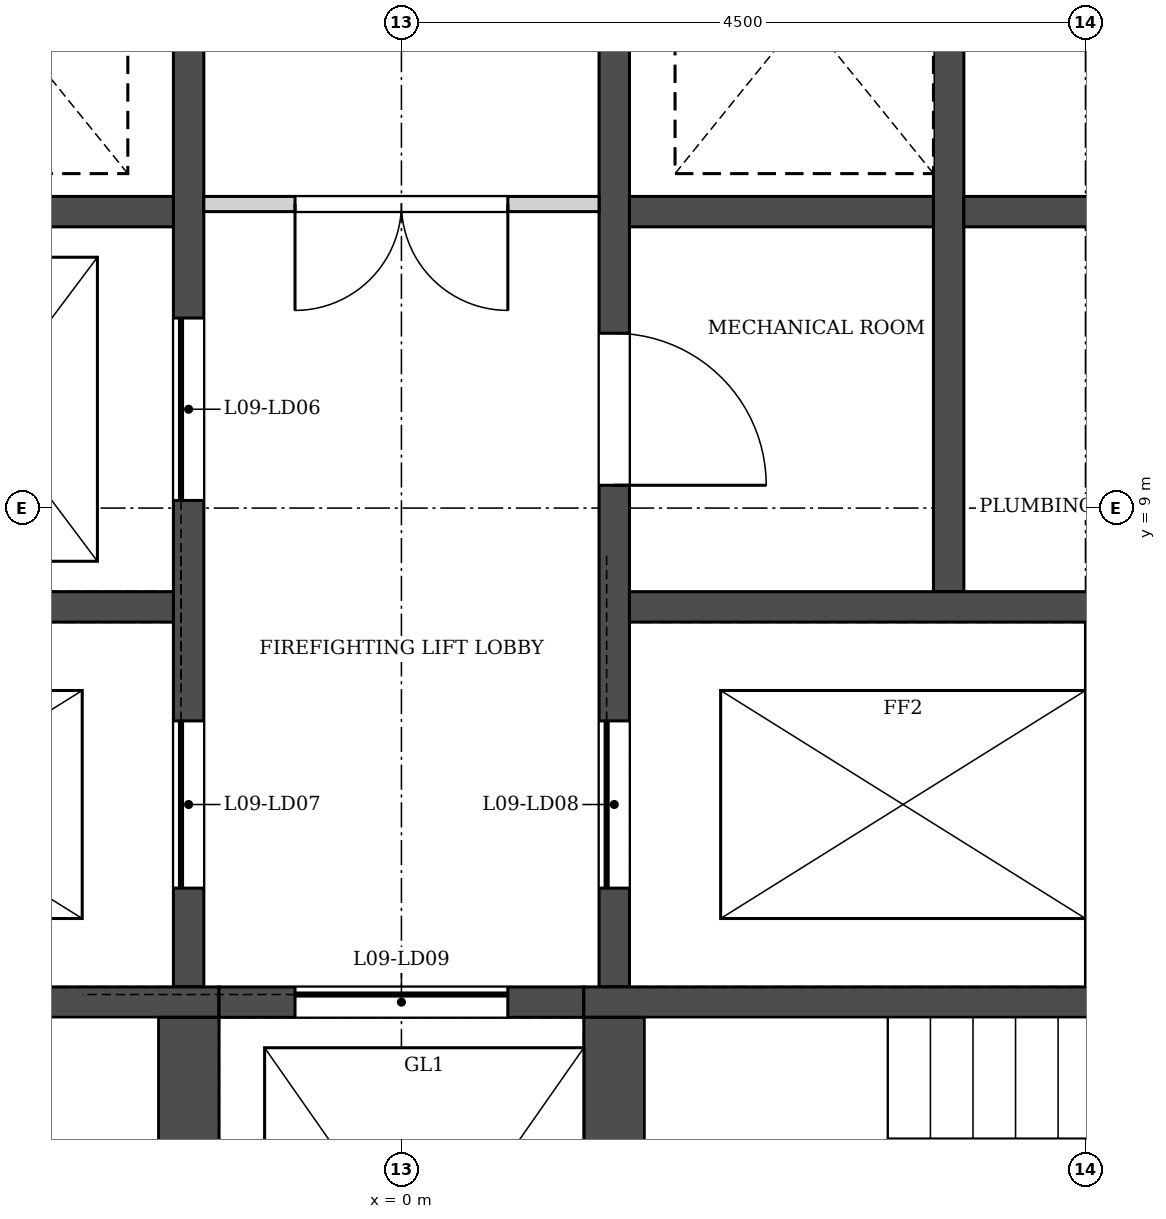
"""IFC4 building model, lengths in metres.
Left out: names, types, materials, properties, quantities, classifications, styles, units other than length and angle.
Written with IfcOpenShell. Run it as: python <this file> out.ifc"""

import sys

from ifc_helpers import new_model, si_unit, direction, frame, frame_2d, origin, place, context, subcontext, project, spatial, rectangle, extrude, element, fill, save


model = new_model("IFC4")
c1 = context("Model", 3, precision=1e-05, world=origin(), true_north=direction((0.0, 1.0)))
c2 = subcontext(c1, "Body", "Model", "MODEL_VIEW")
j1 = project(units=[si_unit("LENGTHUNIT", "METRE"), si_unit("PLANEANGLEUNIT", "RADIAN")], contexts=[c1])
p1 = place(None, origin())
s1 = spatial("IfcSite", under=j1, at=p1, CompositionType="ELEMENT")
p2 = place(p1, origin())
s2 = spatial("IfcBuilding", under=s1, at=p2, CompositionType="ELEMENT")
p3 = place(p2, frame((0.0, 0.0, 47.5)))
s3 = spatial("IfcBuildingStorey", under=s2, at=p3, CompositionType="ELEMENT", Elevation=47.5)
p4 = place(p3, frame((31.98, 7.709, 0.0), z_axis=(0.0, 0.0, 1.0), x_axis=(-0.500000125387, 0.866025331392, 0.0)))
e1 = element("IfcWall", 1, at=p4, inside=s3, PredefinedType="SOLIDWALL", context=c2, shape_type="SweptSolid", body=[
    extrude(rectangle(XDim=55.255, YDim=0.34, at=frame_2d((27.628, 0.0))), origin(), (0.0, 0.0, 1.0), 5.1),
])
p5 = place(p4, frame((1.314, 0.0, 0.9)))
e2 = element("IfcOpeningElement", 2, at=p5, cuts=e1, PredefinedType="OPENING", context=c2, shape_type="SweptSolid", body=[
    extrude(rectangle(XDim=1.885, YDim=3.0, at=frame_2d((0.942, 1.5))), frame((0.0, 0.18, 0.0), z_axis=(0.0, -1.0, 0.0), x_axis=(1.0, 0.0, 0.0)), (0.0, 0.0, 1.0), 0.36),
])
p6 = place(p4, frame((4.314, 0.0, 0.9)))
e3 = element("IfcOpeningElement", 3, at=p6, cuts=e1, PredefinedType="OPENING", context=c2, shape_type="SweptSolid", body=[
    extrude(rectangle(XDim=1.885, YDim=3.0, at=frame_2d((0.942, 1.5))), frame((0.0, 0.18, 0.0), z_axis=(0.0, -1.0, 0.0), x_axis=(1.0, 0.0, 0.0)), (0.0, 0.0, 1.0), 0.36),
])
p7 = place(p4, frame((7.314, 0.0, 0.9)))
e4 = element("IfcOpeningElement", 4, at=p7, cuts=e1, PredefinedType="OPENING", context=c2, shape_type="SweptSolid", body=[
    extrude(rectangle(XDim=1.885, YDim=3.0, at=frame_2d((0.942, 1.5))), frame((0.0, 0.18, 0.0), z_axis=(0.0, -1.0, 0.0), x_axis=(1.0, 0.0, 0.0)), (0.0, 0.0, 1.0), 0.36),
])
p8 = place(p4, frame((10.314, 0.0, 0.9)))
e5 = element("IfcOpeningElement", 5, at=p8, cuts=e1, PredefinedType="OPENING", context=c2, shape_type="SweptSolid", body=[
    extrude(rectangle(XDim=1.885, YDim=3.0, at=frame_2d((0.942, 1.5))), frame((0.0, 0.18, 0.0), z_axis=(0.0, -1.0, 0.0), x_axis=(1.0, 0.0, 0.0)), (0.0, 0.0, 1.0), 0.36),
])
p9 = place(p4, frame((13.314, 0.0, 0.9)))
e6 = element("IfcOpeningElement", 6, at=p9, cuts=e1, PredefinedType="OPENING", context=c2, shape_type="SweptSolid", body=[
    extrude(rectangle(XDim=1.885, YDim=3.0, at=frame_2d((0.942, 1.5))), frame((0.0, 0.18, 0.0), z_axis=(0.0, -1.0, 0.0), x_axis=(1.0, 0.0, 0.0)), (0.0, 0.0, 1.0), 0.36),
])
p10 = place(p4, frame((16.314, 0.0, 0.9)))
e7 = element("IfcOpeningElement", 7, at=p10, cuts=e1, PredefinedType="OPENING", context=c2, shape_type="SweptSolid", body=[
    extrude(rectangle(XDim=1.885, YDim=3.0, at=frame_2d((0.942, 1.5))), frame((0.0, 0.18, 0.0), z_axis=(0.0, -1.0, 0.0), x_axis=(1.0, 0.0, 0.0)), (0.0, 0.0, 1.0), 0.36),
])
p11 = place(p4, frame((19.314, 0.0, 0.9)))
e8 = element("IfcOpeningElement", 8, at=p11, cuts=e1, PredefinedType="OPENING", context=c2, shape_type="SweptSolid", body=[
    extrude(rectangle(XDim=1.885, YDim=3.0, at=frame_2d((0.942, 1.5))), frame((0.0, 0.18, 0.0), z_axis=(0.0, -1.0, 0.0), x_axis=(1.0, 0.0, 0.0)), (0.0, 0.0, 1.0), 0.36),
])
p12 = place(p4, frame((22.314, 0.0, 0.9)))
e9 = element("IfcOpeningElement", 9, at=p12, cuts=e1, PredefinedType="OPENING", context=c2, shape_type="SweptSolid", body=[
    extrude(rectangle(XDim=1.885, YDim=3.0, at=frame_2d((0.942, 1.5))), frame((0.0, 0.18, 0.0), z_axis=(0.0, -1.0, 0.0), x_axis=(1.0, 0.0, 0.0)), (0.0, 0.0, 1.0), 0.36),
])
p13 = place(p4, frame((25.314, 0.0, 0.9)))
e10 = element("IfcOpeningElement", 10, at=p13, cuts=e1, PredefinedType="OPENING", context=c2, shape_type="SweptSolid", body=[
    extrude(rectangle(XDim=1.885, YDim=3.0, at=frame_2d((0.942, 1.5))), frame((0.0, 0.18, 0.0), z_axis=(0.0, -1.0, 0.0), x_axis=(1.0, 0.0, 0.0)), (0.0, 0.0, 1.0), 0.36),
])
p14 = place(p4, frame((28.314, 0.0, 0.9)))
e11 = element("IfcOpeningElement", 11, at=p14, cuts=e1, PredefinedType="OPENING", context=c2, shape_type="SweptSolid", body=[
    extrude(rectangle(XDim=1.885, YDim=3.0, at=frame_2d((0.942, 1.5))), frame((0.0, 0.18, 0.0), z_axis=(0.0, -1.0, 0.0), x_axis=(1.0, 0.0, 0.0)), (0.0, 0.0, 1.0), 0.36),
])
p15 = place(p4, frame((31.314, 0.0, 0.9)))
e12 = element("IfcOpeningElement", 12, at=p15, cuts=e1, PredefinedType="OPENING", context=c2, shape_type="SweptSolid", body=[
    extrude(rectangle(XDim=1.885, YDim=3.0, at=frame_2d((0.942, 1.5))), frame((0.0, 0.18, 0.0), z_axis=(0.0, -1.0, 0.0), x_axis=(1.0, 0.0, 0.0)), (0.0, 0.0, 1.0), 0.36),
])
p16 = place(p4, frame((34.314, 0.0, 0.9)))
e13 = element("IfcOpeningElement", 13, at=p16, cuts=e1, PredefinedType="OPENING", context=c2, shape_type="SweptSolid", body=[
    extrude(rectangle(XDim=1.885, YDim=3.0, at=frame_2d((0.942, 1.5))), frame((0.0, 0.18, 0.0), z_axis=(0.0, -1.0, 0.0), x_axis=(1.0, 0.0, 0.0)), (0.0, 0.0, 1.0), 0.36),
])
p17 = place(p4, frame((37.314, 0.0, 0.9)))
e14 = element("IfcOpeningElement", 14, at=p17, cuts=e1, PredefinedType="OPENING", context=c2, shape_type="SweptSolid", body=[
    extrude(rectangle(XDim=1.885, YDim=3.0, at=frame_2d((0.942, 1.5))), frame((0.0, 0.18, 0.0), z_axis=(0.0, -1.0, 0.0), x_axis=(1.0, 0.0, 0.0)), (0.0, 0.0, 1.0), 0.36),
])
p18 = place(p4, frame((40.314, 0.0, 0.9)))
e15 = element("IfcOpeningElement", 15, at=p18, cuts=e1, PredefinedType="OPENING", context=c2, shape_type="SweptSolid", body=[
    extrude(rectangle(XDim=1.885, YDim=3.0, at=frame_2d((0.942, 1.5))), frame((0.0, 0.18, 0.0), z_axis=(0.0, -1.0, 0.0), x_axis=(1.0, 0.0, 0.0)), (0.0, 0.0, 1.0), 0.36),
])
p19 = place(p4, frame((43.314, 0.0, 0.9)))
e16 = element("IfcOpeningElement", 16, at=p19, cuts=e1, PredefinedType="OPENING", context=c2, shape_type="SweptSolid", body=[
    extrude(rectangle(XDim=1.885, YDim=3.0, at=frame_2d((0.942, 1.5))), frame((0.0, 0.18, 0.0), z_axis=(0.0, -1.0, 0.0), x_axis=(1.0, 0.0, 0.0)), (0.0, 0.0, 1.0), 0.36),
])
p20 = place(p4, frame((46.314, 0.0, 0.9)))
e17 = element("IfcOpeningElement", 17, at=p20, cuts=e1, PredefinedType="OPENING", context=c2, shape_type="SweptSolid", body=[
    extrude(rectangle(XDim=1.885, YDim=3.0, at=frame_2d((0.942, 1.5))), frame((0.0, 0.18, 0.0), z_axis=(0.0, -1.0, 0.0), x_axis=(1.0, 0.0, 0.0)), (0.0, 0.0, 1.0), 0.36),
])
p21 = place(p4, frame((49.314, 0.0, 0.9)))
e18 = element("IfcOpeningElement", 18, at=p21, cuts=e1, PredefinedType="OPENING", context=c2, shape_type="SweptSolid", body=[
    extrude(rectangle(XDim=1.885, YDim=3.0, at=frame_2d((0.942, 1.5))), frame((0.0, 0.18, 0.0), z_axis=(0.0, -1.0, 0.0), x_axis=(1.0, 0.0, 0.0)), (0.0, 0.0, 1.0), 0.36),
])
p22 = place(p4, frame((52.314, 0.0, 0.9)))
e19 = element("IfcOpeningElement", 19, at=p22, cuts=e1, PredefinedType="OPENING", context=c2, shape_type="SweptSolid", body=[
    extrude(rectangle(XDim=1.885, YDim=3.0, at=frame_2d((0.942, 1.5))), frame((0.0, 0.18, 0.0), z_axis=(0.0, -1.0, 0.0), x_axis=(1.0, 0.0, 0.0)), (0.0, 0.0, 1.0), 0.36),
])
p23 = place(p3, frame((3.6, 8.45, -0.3), z_axis=(0.0, 0.0, 1.0), x_axis=(0.0, 1.0, 0.0)))
e20 = element("IfcWall", 20, at=p23, inside=s3, PredefinedType="SOLIDWALL", context=c2, shape_type="SweptSolid", body=[
    extrude(rectangle(XDim=7.8, YDim=0.2, at=frame_2d((3.9, 0.0))), origin(), (0.0, 0.0, 1.0), 5.4),
])
p24 = place(p3, frame((-1.4, 5.85, -0.3), z_axis=(0.0, 0.0, 1.0), x_axis=(0.0, 1.0, 0.0)))
e21 = element("IfcWall", 21, at=p24, inside=s3, PredefinedType="SOLIDWALL", context=c2, shape_type="SweptSolid", body=[
    extrude(rectangle(XDim=11.75, YDim=0.2, at=frame_2d((5.875, 0.0))), origin(), (0.0, 0.0, 1.0), 5.4),
])
p25 = place(p24, frame((3.2, 0.0, 0.3)))
e22 = element("IfcOpeningElement", 22, at=p25, cuts=e21, PredefinedType="OPENING", context=c2, shape_type="SweptSolid", body=[
    extrude(rectangle(XDim=1.2, YDim=2.1, at=frame_2d((0.6, 1.05))), frame((0.0, 0.11, 0.0), z_axis=(0.0, -1.0, 0.0), x_axis=(1.0, 0.0, 0.0)), (0.0, 0.0, 1.0), 0.22),
])
p26 = place(p24, frame((0.65, 0.0, 0.3)))
e23 = element("IfcOpeningElement", 23, at=p26, cuts=e21, PredefinedType="OPENING", context=c2, shape_type="SweptSolid", body=[
    extrude(rectangle(XDim=1.1, YDim=2.1, at=frame_2d((0.55, 1.05))), frame((0.0, 0.11, 0.0), z_axis=(0.0, -1.0, 0.0), x_axis=(1.0, 0.0, 0.0)), (0.0, 0.0, 1.0), 0.22),
])
p27 = place(p3, frame((1.4, 5.85, -0.3), z_axis=(0.0, 0.0, 1.0), x_axis=(0.0, 1.0, 0.0)))
e24 = element("IfcWall", 24, at=p27, inside=s3, PredefinedType="SOLIDWALL", context=c2, shape_type="SweptSolid", body=[
    extrude(rectangle(XDim=11.75, YDim=0.2, at=frame_2d((5.875, 0.0))), origin(), (0.0, 0.0, 1.0), 5.4),
])
p28 = place(p27, frame((0.65, 0.0, 0.3)))
e25 = element("IfcOpeningElement", 25, at=p28, cuts=e24, PredefinedType="OPENING", context=c2, shape_type="SweptSolid", body=[
    extrude(rectangle(XDim=1.1, YDim=2.1, at=frame_2d((0.55, 1.05))), frame((0.0, 0.11, 0.0), z_axis=(0.0, -1.0, 0.0), x_axis=(1.0, 0.0, 0.0)), (0.0, 0.0, 1.0), 0.22),
])
p29 = place(p27, frame((3.3, 0.0, 0.3)))
e26 = element("IfcOpeningElement", 26, at=p29, cuts=e24, PredefinedType="OPENING", context=c2, shape_type="SweptSolid", body=[
    extrude(rectangle(XDim=1.0, YDim=2.1, at=frame_2d((0.5, 1.05))), frame((0.0, 0.11, 0.0), z_axis=(0.0, -1.0, 0.0), x_axis=(1.0, 0.0, 0.0)), (0.0, 0.0, 1.0), 0.22),
])
for number, where, z_axis, x_axis in (
    (27, (-5.7, 8.35, -0.3), (0.0, 0.0, 1.0), (1.0, 0.0, 0.0)),
    (28, (1.5, 8.35, -0.3), (0.0, 0.0, 1.0), (1.0, 0.0, 0.0)),
):
    element("IfcWall", number, at=place(p3, frame(where, z_axis=z_axis, x_axis=x_axis)), inside=s3, PredefinedType="SOLIDWALL", context=c2, shape_type="SweptSolid", body=[
        extrude(rectangle(XDim=4.2, YDim=0.2, at=frame_2d((2.1, 0.0))), origin(), (0.0, 0.0, 1.0), 5.4),
    ])
p30 = place(p3, frame((-12.6, 5.75, -0.3), z_axis=(0.0, 0.0, 1.0), x_axis=(1.0, 0.0, 0.0)))
e29 = element("IfcWall", 29, at=p30, inside=s3, PredefinedType="SOLIDWALL", context=c2, shape_type="SweptSolid", body=[
    extrude(rectangle(XDim=11.4, YDim=0.2, at=frame_2d((5.7, 0.0))), origin(), (0.0, 0.0, 1.0), 5.4),
])
p31 = place(p3, frame((-1.2, 5.75, -0.3), z_axis=(0.0, 0.0, 1.0), x_axis=(1.0, 0.0, 0.0)))
e30 = element("IfcWall", 30, at=p31, inside=s3, PredefinedType="SOLIDWALL", context=c2, shape_type="SweptSolid", body=[
    extrude(rectangle(XDim=2.4, YDim=0.2, at=frame_2d((1.2, 0.0))), origin(), (0.0, 0.0, 1.0), 5.4),
])
p32 = place(p31, frame((0.5, 0.0, 0.3)))
e31 = element("IfcOpeningElement", 31, at=p32, cuts=e30, PredefinedType="OPENING", context=c2, shape_type="SweptSolid", body=[
    extrude(rectangle(XDim=1.4, YDim=2.1, at=frame_2d((0.7, 1.05))), frame((0.0, 0.11, 0.0), z_axis=(0.0, -1.0, 0.0), x_axis=(1.0, 0.0, 0.0)), (0.0, 0.0, 1.0), 0.22),
])
p33 = place(p3, frame((1.2, 5.75, -0.3), z_axis=(0.0, 0.0, 1.0), x_axis=(1.0, 0.0, 0.0)))
e32 = element("IfcWall", 32, at=p33, inside=s3, PredefinedType="SOLIDWALL", context=c2, shape_type="SweptSolid", body=[
    extrude(rectangle(XDim=11.4, YDim=0.2, at=frame_2d((5.7, 0.0))), origin(), (0.0, 0.0, 1.0), 5.4),
])
for number, where, z_axis, x_axis in (
    (33, (-1.4, 2.25, -0.3), (0.0, 0.0, 1.0), (0.0, 1.0, 0.0)),
    (34, (1.4, 2.25, -0.3), (0.0, 0.0, 1.0), (0.0, 1.0, 0.0)),
):
    element("IfcWall", number, at=place(p3, frame(where, z_axis=z_axis, x_axis=x_axis)), inside=s3, PredefinedType="SOLIDWALL", context=c2, shape_type="SweptSolid", body=[
        extrude(rectangle(XDim=3.4, YDim=0.4, at=frame_2d((1.7, 0.0))), origin(), (0.0, 0.0, 1.0), 5.4),
    ])
for number, where, z_axis, x_axis in (
    (35, (-3.5, 10.95, -0.3), (0.0, 0.0, 1.0), (1.0, 0.0, 0.0)),
    (36, (3.7, 10.95, -0.3), (0.0, 0.0, 1.0), (1.0, 0.0, 0.0)),
    (37, (1.5, 10.95, -0.3), (0.0, 0.0, 1.0), (1.0, 0.0, 0.0)),
):
    element("IfcWall", number, at=place(p3, frame(where, z_axis=z_axis, x_axis=x_axis)), inside=s3, PredefinedType="SOLIDWALL", context=c2, shape_type="SweptSolid", body=[
        extrude(rectangle(XDim=2.0, YDim=0.2, at=frame_2d((1.0, 0.0))), origin(), (0.0, 0.0, 1.0), 5.4),
    ])
p34 = place(p3, frame((-1.3, 11.0, 0.0), z_axis=(0.0, 0.0, 1.0), x_axis=(1.0, 0.0, 0.0)))
e38 = element("IfcWall", 38, at=p34, inside=s3, PredefinedType="PARTITIONING", context=c2, shape_type="SweptSolid", body=[
    extrude(rectangle(XDim=2.6, YDim=0.1, at=frame_2d((1.3, 0.0))), origin(), (0.0, 0.0, 1.0), 5.1),
])
p35 = place(p34, frame((0.6, 0.0, 0.0)))
e39 = element("IfcOpeningElement", 39, at=p35, cuts=e38, PredefinedType="OPENING", context=c2, shape_type="SweptSolid", body=[
    extrude(rectangle(XDim=1.4, YDim=2.1, at=frame_2d((0.7, 1.05))), frame((0.0, 0.06, 0.0), z_axis=(0.0, -1.0, 0.0), x_axis=(1.0, 0.0, 0.0)), (0.0, 0.0, 1.0), 0.12),
])
p36 = place(p25, origin())
e40 = element("IfcDoor", 40, at=p36, inside=s3, OperationType="SLIDING_TO_LEFT", PredefinedType="DOOR", context=c2, shape_type="SweptSolid", body=[
    extrude(rectangle(XDim=1.2, YDim=2.1, at=frame_2d((0.6, 1.05))), frame((0.0, 0.025, 0.0), z_axis=(0.0, -1.0, 0.0), x_axis=(1.0, 0.0, 0.0)), (0.0, 0.0, 1.0), 0.05),
])
fill(e22, e40)
p37 = place(p26, origin())
e41 = element("IfcDoor", 41, at=p37, inside=s3, OperationType="SLIDING_TO_RIGHT", PredefinedType="DOOR", context=c2, shape_type="SweptSolid", body=[
    extrude(rectangle(XDim=1.1, YDim=2.1, at=frame_2d((0.55, 1.05))), frame((0.0, 0.025, 0.0), z_axis=(0.0, -1.0, 0.0), x_axis=(1.0, 0.0, 0.0)), (0.0, 0.0, 1.0), 0.05),
])
fill(e23, e41)
p38 = place(p28, origin())
e42 = element("IfcDoor", 42, at=p38, inside=s3, OperationType="SLIDING_TO_RIGHT", PredefinedType="DOOR", context=c2, shape_type="SweptSolid", body=[
    extrude(rectangle(XDim=1.1, YDim=2.1, at=frame_2d((0.55, 1.05))), frame((0.0, 0.025, 0.0), z_axis=(0.0, -1.0, 0.0), x_axis=(1.0, 0.0, 0.0)), (0.0, 0.0, 1.0), 0.05),
])
fill(e25, e42)
p39 = place(p32, origin())
e43 = element("IfcDoor", 43, at=p39, inside=s3, OperationType="SLIDING_TO_LEFT", PredefinedType="DOOR", context=c2, shape_type="SweptSolid", body=[
    extrude(rectangle(XDim=1.4, YDim=2.1, at=frame_2d((0.7, 1.05))), frame((0.0, 0.025, 0.0), z_axis=(0.0, -1.0, 0.0), x_axis=(1.0, 0.0, 0.0)), (0.0, 0.0, 1.0), 0.05),
])
fill(e31, e43)
p40 = place(p29, frame((1.0, 0.0, 0.0), z_axis=(0.0, 0.0, 1.0), x_axis=(-1.0, 0.0, 0.0)))
e44 = element("IfcDoor", 44, at=p40, inside=s3, OperationType="SINGLE_SWING_RIGHT", PredefinedType="DOOR", context=c2, shape_type="SweptSolid", body=[
    extrude(rectangle(XDim=1.0, YDim=2.1, at=frame_2d((0.5, 1.05))), frame((0.0, 0.025, 0.0), z_axis=(0.0, -1.0, 0.0), x_axis=(1.0, 0.0, 0.0)), (0.0, 0.0, 1.0), 0.05),
])
fill(e26, e44)
p41 = place(p35, frame((1.4, 0.0, 0.0), z_axis=(0.0, 0.0, 1.0), x_axis=(-1.0, 0.0, 0.0)))
e45 = element("IfcDoor", 45, at=p41, inside=s3, OperationType="DOUBLE_DOOR_SINGLE_SWING", PredefinedType="DOOR", context=c2, shape_type="SweptSolid", body=[
    extrude(rectangle(XDim=1.4, YDim=2.1, at=frame_2d((0.7, 1.05))), frame((0.0, 0.025, 0.0), z_axis=(0.0, -1.0, 0.0), x_axis=(1.0, 0.0, 0.0)), (0.0, 0.0, 1.0), 0.05),
])
fill(e39, e45)
save(model, sys.argv[1])
